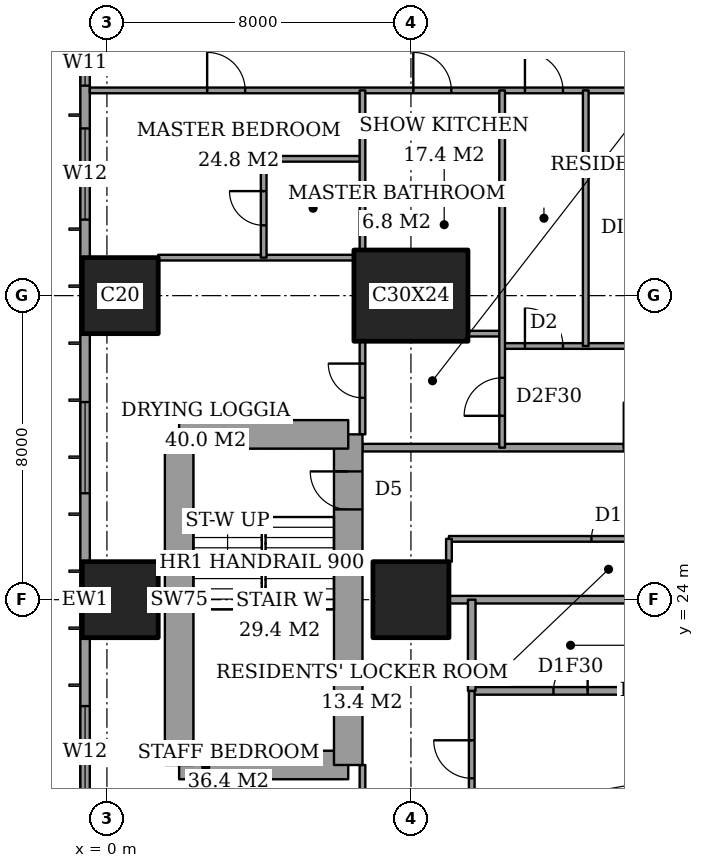
"""IFC4 building model, lengths in metres.
Left out: names, types, materials, properties, quantities, classifications, styles, units other than length and angle.
Written with IfcOpenShell. Run it as: python <this file> out.ifc"""

import sys

from ifc_helpers import new_model, si_unit, direction, frame, frame_2d, origin, origin_2d, place, context, subcontext, project, spatial, rectangle, extrude, element, fill, save


model = new_model("IFC4")
c1 = context("Model", 3, precision=1e-05, world=origin(), true_north=direction((0.0, 1.0)))
c2 = subcontext(c1, "Body", "Model", "MODEL_VIEW")
j1 = project(units=[si_unit("LENGTHUNIT", "METRE"), si_unit("PLANEANGLEUNIT", "RADIAN")], contexts=[c1])
p1 = place(None, origin())
s1 = spatial("IfcSite", under=j1, at=p1, CompositionType="ELEMENT")
p2 = place(p1, origin())
s2 = spatial("IfcBuilding", under=s1, at=p2, CompositionType="ELEMENT")
p3 = place(p2, frame((0.0, 0.0, 161.0)))
s3 = spatial("IfcBuildingStorey", under=s2, at=p3, CompositionType="ELEMENT", Elevation=161.0)
for number, where, z_axis, x_axis in (
    (1, (0.35, 24.0, 0.0), (0.0, 0.0, 1.0), (1.0, 0.0, 0.0)),
    (2, (0.35, 32.0, 0.0), (0.0, 0.0, 1.0), (1.0, 0.0, 0.0)),
    (3, (8.0, 24.0, 0.0), (0.0, 0.0, 1.0), (1.0, 0.0, 0.0)),
):
    element("IfcColumn", number, at=place(p3, frame(where, z_axis=z_axis, x_axis=x_axis)), inside=s3, PredefinedType="COLUMN", context=c2, shape_type="SweptSolid", body=[
        extrude(rectangle(XDim=2.0, YDim=2.0, at=origin_2d()), origin(), (0.0, 0.0, 1.0), 3.6),
    ])
p4 = place(p3, frame((8.0, 32.0, 0.0), z_axis=(0.0, 0.0, 1.0), x_axis=(1.0, 0.0, 0.0)))
e4 = element("IfcColumn", 4, at=p4, inside=s3, PredefinedType="COLUMN", context=c2, shape_type="SweptSolid", body=[
    extrude(rectangle(XDim=3.0, YDim=2.4, at=origin_2d()), origin(), (0.0, 0.0, 1.0), 3.6),
])
p5 = place(p3, frame((1.9, 19.65, 0.0), z_axis=(0.0, 0.0, 1.0), x_axis=(1.0, 0.0, 0.0)))
e5 = element("IfcWall", 5, at=p5, inside=s3, PredefinedType="SHEAR", context=c2, shape_type="SweptSolid", body=[
    extrude(rectangle(XDim=4.45, YDim=0.75, at=frame_2d((2.225, 0.0))), origin(), (0.0, 0.0, 1.0), 3.6),
])
p6 = place(p3, frame((6.35, 19.65, 0.0), z_axis=(0.0, 0.0, 1.0), x_axis=(0.0, 1.0, 0.0)))
e6 = element("IfcWall", 6, at=p6, inside=s3, PredefinedType="SHEAR", context=c2, shape_type="SweptSolid", body=[
    extrude(rectangle(XDim=8.7, YDim=0.75, at=frame_2d((4.35, 0.0))), origin(), (0.0, 0.0, 1.0), 3.6),
])
p7 = place(p6, frame((6.725, 0.0, 0.0)))
e7 = element("IfcOpeningElement", 7, at=p7, cuts=e6, PredefinedType="OPENING", context=c2, shape_type="SweptSolid", body=[
    extrude(rectangle(XDim=1.0, YDim=2.1, at=frame_2d((0.5, 1.05))), frame((0.0, 0.385, 0.0), z_axis=(0.0, -1.0, 0.0), x_axis=(1.0, 0.0, 0.0)), (0.0, 0.0, 1.0), 0.77),
])
p8 = place(p3, frame((6.35, 28.35, 0.0), z_axis=(0.0, 0.0, 1.0), x_axis=(-1.0, 0.0, 0.0)))
e8 = element("IfcWall", 8, at=p8, inside=s3, PredefinedType="SHEAR", context=c2, shape_type="SweptSolid", body=[
    extrude(rectangle(XDim=4.45, YDim=0.75, at=frame_2d((2.225, 0.0))), origin(), (0.0, 0.0, 1.0), 3.6),
])
p9 = place(p3, frame((1.9, 28.35, 0.0), z_axis=(0.0, 0.0, 1.0), x_axis=(0.0, -1.0, 0.0)))
e9 = element("IfcWall", 9, at=p9, inside=s3, PredefinedType="SHEAR", context=c2, shape_type="SweptSolid", body=[
    extrude(rectangle(XDim=8.7, YDim=0.75, at=frame_2d((4.35, 0.0))), origin(), (0.0, 0.0, 1.0), 3.6),
])
p10 = place(p3, frame((-0.575, 44.825, 0.0), z_axis=(0.0, 0.0, 1.0), x_axis=(0.0, -1.0, 0.0)))
e10 = element("IfcWall", 10, at=p10, inside=s3, PredefinedType="SOLIDWALL", context=c2, shape_type="SweptSolid", body=[
    extrude(rectangle(XDim=41.65, YDim=0.25, at=frame_2d((20.825, 0.0))), origin(), (0.0, 0.0, 1.0), 3.6),
])
p11 = place(p10, frame((0.775, 0.0, 0.4)))
e11 = element("IfcOpeningElement", 11, at=p11, cuts=e10, PredefinedType="OPENING", context=c2, shape_type="SweptSolid", body=[
    extrude(rectangle(XDim=2.4, YDim=2.2, at=frame_2d((1.2, 1.1))), frame((0.0, 0.135, 0.0), z_axis=(0.0, -1.0, 0.0), x_axis=(1.0, 0.0, 0.0)), (0.0, 0.0, 1.0), 0.27),
])
p12 = place(p10, frame((6.1, 0.0, 0.4)))
e12 = element("IfcOpeningElement", 12, at=p12, cuts=e10, PredefinedType="OPENING", context=c2, shape_type="SweptSolid", body=[
    extrude(rectangle(XDim=1.2, YDim=2.2, at=frame_2d((0.6, 1.1))), frame((0.0, 0.135, 0.0), z_axis=(0.0, -1.0, 0.0), x_axis=(1.0, 0.0, 0.0)), (0.0, 0.0, 1.0), 0.27),
])
p13 = place(p10, frame((8.425, 0.0, 0.4)))
e13 = element("IfcOpeningElement", 13, at=p13, cuts=e10, PredefinedType="OPENING", context=c2, shape_type="SweptSolid", body=[
    extrude(rectangle(XDim=2.4, YDim=2.2, at=frame_2d((1.2, 1.1))), frame((0.0, 0.135, 0.0), z_axis=(0.0, -1.0, 0.0), x_axis=(1.0, 0.0, 0.0)), (0.0, 0.0, 1.0), 0.27),
])
p14 = place(p10, frame((15.625, 0.0, 0.4)))
e14 = element("IfcOpeningElement", 14, at=p14, cuts=e10, PredefinedType="OPENING", context=c2, shape_type="SweptSolid", body=[
    extrude(rectangle(XDim=2.4, YDim=2.2, at=frame_2d((1.2, 1.1))), frame((0.0, 0.135, 0.0), z_axis=(0.0, -1.0, 0.0), x_axis=(1.0, 0.0, 0.0)), (0.0, 0.0, 1.0), 0.27),
])
p15 = place(p10, frame((23.625, 0.0, 0.4)))
e15 = element("IfcOpeningElement", 15, at=p15, cuts=e10, PredefinedType="OPENING", context=c2, shape_type="SweptSolid", body=[
    extrude(rectangle(XDim=2.4, YDim=2.2, at=frame_2d((1.2, 1.1))), frame((0.0, 0.135, 0.0), z_axis=(0.0, -1.0, 0.0), x_axis=(1.0, 0.0, 0.0)), (0.0, 0.0, 1.0), 0.27),
])
p16 = place(p10, frame((30.825, 0.0, 0.4)))
e16 = element("IfcOpeningElement", 16, at=p16, cuts=e10, PredefinedType="OPENING", context=c2, shape_type="SweptSolid", body=[
    extrude(rectangle(XDim=2.4, YDim=2.2, at=frame_2d((1.2, 1.1))), frame((0.0, 0.135, 0.0), z_axis=(0.0, -1.0, 0.0), x_axis=(1.0, 0.0, 0.0)), (0.0, 0.0, 1.0), 0.27),
])
p17 = place(p10, frame((34.5, 0.0, 0.4)))
e17 = element("IfcOpeningElement", 17, at=p17, cuts=e10, PredefinedType="OPENING", context=c2, shape_type="SweptSolid", body=[
    extrude(rectangle(XDim=1.2, YDim=2.2, at=frame_2d((0.6, 1.1))), frame((0.0, 0.135, 0.0), z_axis=(0.0, -1.0, 0.0), x_axis=(1.0, 0.0, 0.0)), (0.0, 0.0, 1.0), 0.27),
])
p18 = place(p10, frame((38.475, 0.0, 0.4)))
e18 = element("IfcOpeningElement", 18, at=p18, cuts=e10, PredefinedType="OPENING", context=c2, shape_type="SweptSolid", body=[
    extrude(rectangle(XDim=2.4, YDim=2.2, at=frame_2d((1.2, 1.1))), frame((0.0, 0.135, 0.0), z_axis=(0.0, -1.0, 0.0), x_axis=(1.0, 0.0, 0.0)), (0.0, 0.0, 1.0), 0.27),
])
p19 = place(p3, frame((9.6, 21.6, 0.0), z_axis=(0.0, 0.0, 1.0), x_axis=(1.0, 0.0, 0.0)))
e19 = element("IfcWall", 19, at=p19, inside=s3, PredefinedType="PARTITIONING", context=c2, shape_type="SweptSolid", body=[
    extrude(rectangle(XDim=5.2, YDim=0.2, at=frame_2d((2.6, 0.0))), origin(), (0.0, 0.0, 1.0), 3.35),
])
p20 = place(p19, frame((2.15, 0.0, 0.0)))
e20 = element("IfcOpeningElement", 20, at=p20, cuts=e19, PredefinedType="OPENING", context=c2, shape_type="SweptSolid", body=[
    extrude(rectangle(XDim=0.9, YDim=2.1, at=frame_2d((0.45, 1.05))), frame((0.0, 0.11, 0.0), z_axis=(0.0, -1.0, 0.0), x_axis=(1.0, 0.0, 0.0)), (0.0, 0.0, 1.0), 0.22),
])
p21 = place(p3, frame((9.0, 24.0, 0.0), z_axis=(0.0, 0.0, 1.0), x_axis=(1.0, 0.0, 0.0)))
e21 = element("IfcWall", 21, at=p21, inside=s3, PredefinedType="PARTITIONING", context=c2, shape_type="SweptSolid", body=[
    extrude(rectangle(XDim=6.0, YDim=0.2, at=frame_2d((3.0, 0.0))), origin(), (0.0, 0.0, 1.0), 3.35),
])
p22 = place(p3, frame((9.0, 25.6, 0.0), z_axis=(0.0, 0.0, 1.0), x_axis=(1.0, 0.0, 0.0)))
e22 = element("IfcWall", 22, at=p22, inside=s3, PredefinedType="PARTITIONING", context=c2, shape_type="SweptSolid", body=[
    extrude(rectangle(XDim=8.4, YDim=0.15, at=frame_2d((4.2, 0.0))), origin(), (0.0, 0.0, 1.0), 3.35),
])
p23 = place(p22, frame((3.75, 0.0, 0.0)))
e23 = element("IfcOpeningElement", 23, at=p23, cuts=e22, PredefinedType="OPENING", context=c2, shape_type="SweptSolid", body=[
    extrude(rectangle(XDim=0.9, YDim=2.1, at=frame_2d((0.45, 1.05))), frame((0.0, 0.085, 0.0), z_axis=(0.0, -1.0, 0.0), x_axis=(1.0, 0.0, 0.0)), (0.0, 0.0, 1.0), 0.17),
])
p24 = place(p3, frame((6.725, 28.0, 0.0), z_axis=(0.0, 0.0, 1.0), x_axis=(1.0, 0.0, 0.0)))
e24 = element("IfcWall", 24, at=p24, inside=s3, PredefinedType="PARTITIONING", context=c2, shape_type="SweptSolid", body=[
    extrude(rectangle(XDim=17.275, YDim=0.2, at=frame_2d((8.637, 0.0))), origin(), (0.0, 0.0, 1.0), 3.35),
])
p25 = place(p24, frame((6.875, 0.0, 0.0)))
e25 = element("IfcOpeningElement", 25, at=p25, cuts=e24, PredefinedType="OPENING", context=c2, shape_type="SweptSolid", body=[
    extrude(rectangle(XDim=1.2, YDim=2.4, at=frame_2d((0.6, 1.2))), frame((0.0, 0.11, 0.0), z_axis=(0.0, -1.0, 0.0), x_axis=(1.0, 0.0, 0.0)), (0.0, 0.0, 1.0), 0.22),
])
p26 = place(p3, frame((10.4, 30.675, 0.0), z_axis=(0.0, 0.0, 1.0), x_axis=(1.0, 0.0, 0.0)))
e26 = element("IfcWall", 26, at=p26, inside=s3, PredefinedType="PARTITIONING", context=c2, shape_type="SweptSolid", body=[
    extrude(rectangle(XDim=4.0, YDim=0.15, at=frame_2d((2.0, 0.0))), origin(), (0.0, 0.0, 1.0), 3.35),
])
p27 = place(p26, frame((0.6, 0.0, 0.0)))
e27 = element("IfcOpeningElement", 27, at=p27, cuts=e26, PredefinedType="OPENING", context=c2, shape_type="SweptSolid", body=[
    extrude(rectangle(XDim=1.0, YDim=2.1, at=frame_2d((0.5, 1.05))), frame((0.0, 0.085, 0.0), z_axis=(0.0, -1.0, 0.0), x_axis=(1.0, 0.0, 0.0)), (0.0, 0.0, 1.0), 0.17),
])
p28 = place(p3, frame((9.5, 31.0, 0.0), z_axis=(0.0, 0.0, 1.0), x_axis=(1.0, 0.0, 0.0)))
e28 = element("IfcWall", 28, at=p28, inside=s3, PredefinedType="PARTITIONING", context=c2, shape_type="SweptSolid", body=[
    extrude(rectangle(XDim=0.9, YDim=0.15, at=frame_2d((0.45, 0.0))), origin(), (0.0, 0.0, 1.0), 3.35),
])
p29 = place(p3, frame((1.35, 33.0, 0.0), z_axis=(0.0, 0.0, 1.0), x_axis=(1.0, 0.0, 0.0)))
e29 = element("IfcWall", 29, at=p29, inside=s3, PredefinedType="PARTITIONING", context=c2, shape_type="SweptSolid", body=[
    extrude(rectangle(XDim=5.15, YDim=0.15, at=frame_2d((2.575, 0.0))), origin(), (0.0, 0.0, 1.0), 3.35),
])
p30 = place(p3, frame((4.125, 35.6, 0.0), z_axis=(0.0, 0.0, 1.0), x_axis=(1.0, 0.0, 0.0)))
e30 = element("IfcWall", 30, at=p30, inside=s3, PredefinedType="PARTITIONING", context=c2, shape_type="SweptSolid", body=[
    extrude(rectangle(XDim=2.6, YDim=0.15, at=frame_2d((1.3, 0.0))), origin(), (0.0, 0.0, 1.0), 3.35),
])
p31 = place(p3, frame((-0.45, 37.4, 0.0), z_axis=(0.0, 0.0, 1.0), x_axis=(1.0, 0.0, 0.0)))
e31 = element("IfcWall", 31, at=p31, inside=s3, PredefinedType="PARTITIONING", context=c2, shape_type="SweptSolid", body=[
    extrude(rectangle(XDim=25.011, YDim=0.15, at=frame_2d((12.505, 0.0))), origin(), (0.0, 0.0, 1.0), 3.35),
])
p32 = place(p31, frame((11.45, 0.0, 0.0)))
e32 = element("IfcOpeningElement", 32, at=p32, cuts=e31, PredefinedType="OPENING", context=c2, shape_type="SweptSolid", body=[
    extrude(rectangle(XDim=1.0, YDim=2.1, at=frame_2d((0.5, 1.05))), frame((0.0, 0.085, 0.0), z_axis=(0.0, -1.0, 0.0), x_axis=(1.0, 0.0, 0.0)), (0.0, 0.0, 1.0), 0.17),
])
p33 = place(p31, frame((3.087, 0.0, 0.0)))
e33 = element("IfcOpeningElement", 33, at=p33, cuts=e31, PredefinedType="OPENING", context=c2, shape_type="SweptSolid", body=[
    extrude(rectangle(XDim=1.0, YDim=2.1, at=frame_2d((0.5, 1.05))), frame((0.0, 0.085, 0.0), z_axis=(0.0, -1.0, 0.0), x_axis=(1.0, 0.0, 0.0)), (0.0, 0.0, 1.0), 0.17),
])
p34 = place(p31, frame((8.512, 0.0, 0.0)))
e34 = element("IfcOpeningElement", 34, at=p34, cuts=e31, PredefinedType="OPENING", context=c2, shape_type="SweptSolid", body=[
    extrude(rectangle(XDim=1.0, YDim=2.1, at=frame_2d((0.5, 1.05))), frame((0.0, 0.085, 0.0), z_axis=(0.0, -1.0, 0.0), x_axis=(1.0, 0.0, 0.0)), (0.0, 0.0, 1.0), 0.17),
])
p35 = place(p31, frame((15.25, 0.0, 0.0)))
e35 = element("IfcOpeningElement", 35, at=p35, cuts=e31, PredefinedType="OPENING", context=c2, shape_type="SweptSolid", body=[
    extrude(rectangle(XDim=1.0, YDim=2.1, at=frame_2d((0.5, 1.05))), frame((0.0, 0.085, 0.0), z_axis=(0.0, -1.0, 0.0), x_axis=(1.0, 0.0, 0.0)), (0.0, 0.0, 1.0), 0.17),
])
p36 = place(p31, frame((21.175, 0.0, 0.0)))
e36 = element("IfcOpeningElement", 36, at=p36, cuts=e31, PredefinedType="OPENING", context=c2, shape_type="SweptSolid", body=[
    extrude(rectangle(XDim=1.0, YDim=2.1, at=frame_2d((0.5, 1.05))), frame((0.0, 0.085, 0.0), z_axis=(0.0, -1.0, 0.0), x_axis=(1.0, 0.0, 0.0)), (0.0, 0.0, 1.0), 0.17),
])
p37 = place(p3, frame((4.125, 33.0, 0.0), z_axis=(0.0, 0.0, 1.0), x_axis=(0.0, 1.0, 0.0)))
e37 = element("IfcWall", 37, at=p37, inside=s3, PredefinedType="PARTITIONING", context=c2, shape_type="SweptSolid", body=[
    extrude(rectangle(XDim=2.6, YDim=0.15, at=frame_2d((1.3, 0.0))), origin(), (0.0, 0.0, 1.0), 3.35),
])
p38 = place(p37, frame((0.85, 0.0, 0.0)))
e38 = element("IfcOpeningElement", 38, at=p38, cuts=e37, PredefinedType="OPENING", context=c2, shape_type="SweptSolid", body=[
    extrude(rectangle(XDim=0.9, YDim=2.1, at=frame_2d((0.45, 1.05))), frame((0.0, 0.085, 0.0), z_axis=(0.0, -1.0, 0.0), x_axis=(1.0, 0.0, 0.0)), (0.0, 0.0, 1.0), 0.17),
])
p39 = place(p3, frame((6.725, 17.2, 0.0), z_axis=(0.0, 0.0, 1.0), x_axis=(0.0, 1.0, 0.0)))
e39 = element("IfcWall", 39, at=p39, inside=s3, PredefinedType="PARTITIONING", context=c2, shape_type="SweptSolid", body=[
    extrude(rectangle(XDim=2.45, YDim=0.15, at=frame_2d((1.225, 0.0))), origin(), (0.0, 0.0, 1.0), 3.35),
])
p40 = place(p39, frame((0.538, 0.0, 0.0)))
e40 = element("IfcOpeningElement", 40, at=p40, cuts=e39, PredefinedType="OPENING", context=c2, shape_type="SweptSolid", body=[
    extrude(rectangle(XDim=1.0, YDim=2.1, at=frame_2d((0.5, 1.05))), frame((0.0, 0.085, 0.0), z_axis=(0.0, -1.0, 0.0), x_axis=(1.0, 0.0, 0.0)), (0.0, 0.0, 1.0), 0.17),
])
p41 = place(p3, frame((6.725, 28.35, 0.0), z_axis=(0.0, 0.0, 1.0), x_axis=(0.0, 1.0, 0.0)))
e41 = element("IfcWall", 41, at=p41, inside=s3, PredefinedType="PARTITIONING", context=c2, shape_type="SweptSolid", body=[
    extrude(rectangle(XDim=2.45, YDim=0.15, at=frame_2d((1.225, 0.0))), origin(), (0.0, 0.0, 1.0), 3.35),
])
p42 = place(p41, frame((0.962, 0.0, 0.0)))
e42 = element("IfcOpeningElement", 42, at=p42, cuts=e41, PredefinedType="OPENING", context=c2, shape_type="SweptSolid", body=[
    extrude(rectangle(XDim=0.9, YDim=2.1, at=frame_2d((0.45, 1.05))), frame((0.0, 0.085, 0.0), z_axis=(0.0, -1.0, 0.0), x_axis=(1.0, 0.0, 0.0)), (0.0, 0.0, 1.0), 0.17),
])
p43 = place(p3, frame((6.725, 33.2, 0.0), z_axis=(0.0, 0.0, 1.0), x_axis=(0.0, 1.0, 0.0)))
e43 = element("IfcWall", 43, at=p43, inside=s3, PredefinedType="PARTITIONING", context=c2, shape_type="SweptSolid", body=[
    extrude(rectangle(XDim=4.2, YDim=0.15, at=frame_2d((2.1, 0.0))), origin(), (0.0, 0.0, 1.0), 3.35),
])
p44 = place(p3, frame((9.0, 25.0, 0.0), z_axis=(0.0, 0.0, 1.0), x_axis=(0.0, 1.0, 0.0)))
e44 = element("IfcWall", 44, at=p44, inside=s3, PredefinedType="PARTITIONING", context=c2, shape_type="SweptSolid", body=[
    extrude(rectangle(XDim=0.6, YDim=0.15, at=frame_2d((0.3, 0.0))), origin(), (0.0, 0.0, 1.0), 3.35),
])
p45 = place(p3, frame((9.6, 21.6, 0.0), z_axis=(0.0, 0.0, 1.0), x_axis=(0.0, 1.0, 0.0)))
e45 = element("IfcWall", 45, at=p45, inside=s3, PredefinedType="PARTITIONING", context=c2, shape_type="SweptSolid", body=[
    extrude(rectangle(XDim=2.4, YDim=0.2, at=frame_2d((1.2, 0.0))), origin(), (0.0, 0.0, 1.0), 3.35),
])
p46 = place(p3, frame((9.6, 10.6, 0.0), z_axis=(0.0, 0.0, 1.0), x_axis=(0.0, 1.0, 0.0)))
e46 = element("IfcWall", 46, at=p46, inside=s3, PredefinedType="PARTITIONING", context=c2, shape_type="SweptSolid", body=[
    extrude(rectangle(XDim=11.0, YDim=0.15, at=frame_2d((5.5, 0.0))), origin(), (0.0, 0.0, 1.0), 3.35),
])
p47 = place(p46, frame((8.7, 0.0, 0.0)))
e47 = element("IfcOpeningElement", 47, at=p47, cuts=e46, PredefinedType="OPENING", context=c2, shape_type="SweptSolid", body=[
    extrude(rectangle(XDim=1.0, YDim=2.1, at=frame_2d((0.5, 1.05))), frame((0.0, 0.085, 0.0), z_axis=(0.0, -1.0, 0.0), x_axis=(1.0, 0.0, 0.0)), (0.0, 0.0, 1.0), 0.17),
])
p48 = place(p3, frame((10.4, 28.0, 0.0), z_axis=(0.0, 0.0, 1.0), x_axis=(0.0, 1.0, 0.0)))
e48 = element("IfcWall", 48, at=p48, inside=s3, PredefinedType="PARTITIONING", context=c2, shape_type="SweptSolid", body=[
    extrude(rectangle(XDim=9.4, YDim=0.15, at=frame_2d((4.7, 0.0))), origin(), (0.0, 0.0, 1.0), 3.35),
])
p49 = place(p48, frame((0.837, 0.0, 0.0)))
e49 = element("IfcOpeningElement", 49, at=p49, cuts=e48, PredefinedType="OPENING", context=c2, shape_type="SweptSolid", body=[
    extrude(rectangle(XDim=1.0, YDim=2.1, at=frame_2d((0.5, 1.05))), frame((0.0, 0.085, 0.0), z_axis=(0.0, -1.0, 0.0), x_axis=(1.0, 0.0, 0.0)), (0.0, 0.0, 1.0), 0.17),
])
p50 = place(p3, frame((12.6, 30.675, 0.0), z_axis=(0.0, 0.0, 1.0), x_axis=(0.0, 1.0, 0.0)))
e50 = element("IfcWall", 50, at=p50, inside=s3, PredefinedType="PARTITIONING", context=c2, shape_type="SweptSolid", body=[
    extrude(rectangle(XDim=6.725, YDim=0.15, at=frame_2d((3.362, 0.0))), origin(), (0.0, 0.0, 1.0), 3.35),
])
p51 = place(p12, origin())
e51 = element("IfcWindow", 51, at=p51, inside=s3, PartitioningType="SINGLE_PANEL", PredefinedType="WINDOW", context=c2, shape_type="SweptSolid", body=[
    extrude(rectangle(XDim=1.2, YDim=2.2, at=frame_2d((0.6, 1.1))), frame((0.0, 0.03, 0.0), z_axis=(0.0, -1.0, 0.0), x_axis=(1.0, 0.0, 0.0)), (0.0, 0.0, 1.0), 0.06),
])
fill(e12, e51)
p52 = place(p13, origin())
e52 = element("IfcWindow", 52, at=p52, inside=s3, PartitioningType="SINGLE_PANEL", PredefinedType="WINDOW", context=c2, shape_type="SweptSolid", body=[
    extrude(rectangle(XDim=2.4, YDim=2.2, at=frame_2d((1.2, 1.1))), frame((0.0, 0.03, 0.0), z_axis=(0.0, -1.0, 0.0), x_axis=(1.0, 0.0, 0.0)), (0.0, 0.0, 1.0), 0.06),
])
fill(e13, e52)
p53 = place(p14, origin())
e53 = element("IfcWindow", 53, at=p53, inside=s3, PartitioningType="SINGLE_PANEL", PredefinedType="WINDOW", context=c2, shape_type="SweptSolid", body=[
    extrude(rectangle(XDim=2.4, YDim=2.2, at=frame_2d((1.2, 1.1))), frame((0.0, 0.03, 0.0), z_axis=(0.0, -1.0, 0.0), x_axis=(1.0, 0.0, 0.0)), (0.0, 0.0, 1.0), 0.06),
])
fill(e14, e53)
p54 = place(p15, origin())
e54 = element("IfcWindow", 54, at=p54, inside=s3, PartitioningType="SINGLE_PANEL", PredefinedType="WINDOW", context=c2, shape_type="SweptSolid", body=[
    extrude(rectangle(XDim=2.4, YDim=2.2, at=frame_2d((1.2, 1.1))), frame((0.0, 0.03, 0.0), z_axis=(0.0, -1.0, 0.0), x_axis=(1.0, 0.0, 0.0)), (0.0, 0.0, 1.0), 0.06),
])
fill(e15, e54)
p55 = place(p47, origin())
e55 = element("IfcDoor", 55, at=p55, inside=s3, OperationType="SINGLE_SWING_LEFT", PredefinedType="DOOR", context=c2, shape_type="SweptSolid", body=[
    extrude(rectangle(XDim=1.0, YDim=2.1, at=frame_2d((0.5, 1.05))), frame((0.0, 0.025, 0.0), z_axis=(0.0, -1.0, 0.0), x_axis=(1.0, 0.0, 0.0)), (0.0, 0.0, 1.0), 0.05),
])
fill(e47, e55)
p56 = place(p20, origin())
e56 = element("IfcDoor", 56, at=p56, inside=s3, OperationType="SINGLE_SWING_LEFT", PredefinedType="DOOR", context=c2, shape_type="SweptSolid", body=[
    extrude(rectangle(XDim=0.9, YDim=2.1, at=frame_2d((0.45, 1.05))), frame((0.0, 0.025, 0.0), z_axis=(0.0, -1.0, 0.0), x_axis=(1.0, 0.0, 0.0)), (0.0, 0.0, 1.0), 0.05),
])
fill(e20, e56)
p57 = place(p32, origin())
e57 = element("IfcDoor", 57, at=p57, inside=s3, OperationType="SINGLE_SWING_RIGHT", PredefinedType="DOOR", context=c2, shape_type="SweptSolid", body=[
    extrude(rectangle(XDim=1.0, YDim=2.1, at=frame_2d((0.5, 1.05))), frame((0.0, 0.025, 0.0), z_axis=(0.0, -1.0, 0.0), x_axis=(1.0, 0.0, 0.0)), (0.0, 0.0, 1.0), 0.05),
])
fill(e32, e57)
p58 = place(p38, origin())
e58 = element("IfcDoor", 58, at=p58, inside=s3, OperationType="SINGLE_SWING_LEFT", PredefinedType="DOOR", context=c2, shape_type="SweptSolid", body=[
    extrude(rectangle(XDim=0.9, YDim=2.1, at=frame_2d((0.45, 1.05))), frame((0.0, 0.025, 0.0), z_axis=(0.0, -1.0, 0.0), x_axis=(1.0, 0.0, 0.0)), (0.0, 0.0, 1.0), 0.05),
])
fill(e38, e58)
p59 = place(p33, origin())
e59 = element("IfcDoor", 59, at=p59, inside=s3, OperationType="SINGLE_SWING_RIGHT", PredefinedType="DOOR", context=c2, shape_type="SweptSolid", body=[
    extrude(rectangle(XDim=1.0, YDim=2.1, at=frame_2d((0.5, 1.05))), frame((0.0, 0.025, 0.0), z_axis=(0.0, -1.0, 0.0), x_axis=(1.0, 0.0, 0.0)), (0.0, 0.0, 1.0), 0.05),
])
fill(e33, e59)
p60 = place(p42, origin())
e60 = element("IfcDoor", 60, at=p60, inside=s3, OperationType="SINGLE_SWING_LEFT", PredefinedType="DOOR", context=c2, shape_type="SweptSolid", body=[
    extrude(rectangle(XDim=0.9, YDim=2.1, at=frame_2d((0.45, 1.05))), frame((0.0, 0.025, 0.0), z_axis=(0.0, -1.0, 0.0), x_axis=(1.0, 0.0, 0.0)), (0.0, 0.0, 1.0), 0.05),
])
fill(e42, e60)
p61 = place(p34, origin())
e61 = element("IfcDoor", 61, at=p61, inside=s3, OperationType="SINGLE_SWING_RIGHT", PredefinedType="DOOR", context=c2, shape_type="SweptSolid", body=[
    extrude(rectangle(XDim=1.0, YDim=2.1, at=frame_2d((0.5, 1.05))), frame((0.0, 0.025, 0.0), z_axis=(0.0, -1.0, 0.0), x_axis=(1.0, 0.0, 0.0)), (0.0, 0.0, 1.0), 0.05),
])
fill(e34, e61)
p62 = place(p49, origin())
e62 = element("IfcDoor", 62, at=p62, inside=s3, OperationType="SINGLE_SWING_RIGHT", PredefinedType="DOOR", context=c2, shape_type="SweptSolid", body=[
    extrude(rectangle(XDim=1.0, YDim=2.1, at=frame_2d((0.5, 1.05))), frame((0.0, 0.025, 0.0), z_axis=(0.0, -1.0, 0.0), x_axis=(1.0, 0.0, 0.0)), (0.0, 0.0, 1.0), 0.05),
])
fill(e49, e62)
p63 = place(p27, origin())
e63 = element("IfcDoor", 63, at=p63, inside=s3, OperationType="SINGLE_SWING_RIGHT", PredefinedType="DOOR", context=c2, shape_type="SweptSolid", body=[
    extrude(rectangle(XDim=1.0, YDim=2.1, at=frame_2d((0.5, 1.05))), frame((0.0, 0.025, 0.0), z_axis=(0.0, -1.0, 0.0), x_axis=(1.0, 0.0, 0.0)), (0.0, 0.0, 1.0), 0.05),
])
fill(e27, e63)
p64 = place(p23, origin())
e64 = element("IfcDoor", 64, at=p64, inside=s3, OperationType="SINGLE_SWING_LEFT", PredefinedType="DOOR", context=c2, shape_type="SweptSolid", body=[
    extrude(rectangle(XDim=0.9, YDim=2.1, at=frame_2d((0.45, 1.05))), frame((0.0, 0.025, 0.0), z_axis=(0.0, -1.0, 0.0), x_axis=(1.0, 0.0, 0.0)), (0.0, 0.0, 1.0), 0.05),
])
fill(e23, e64)
p65 = place(p7, origin())
e65 = element("IfcDoor", 65, at=p65, inside=s3, OperationType="SINGLE_SWING_LEFT", PredefinedType="DOOR", context=c2, shape_type="SweptSolid", body=[
    extrude(rectangle(XDim=1.0, YDim=2.1, at=frame_2d((0.5, 1.05))), frame((0.0, 0.025, 0.0), z_axis=(0.0, -1.0, 0.0), x_axis=(1.0, 0.0, 0.0)), (0.0, 0.0, 1.0), 0.05),
])
fill(e7, e65)
save(model, sys.argv[1])
